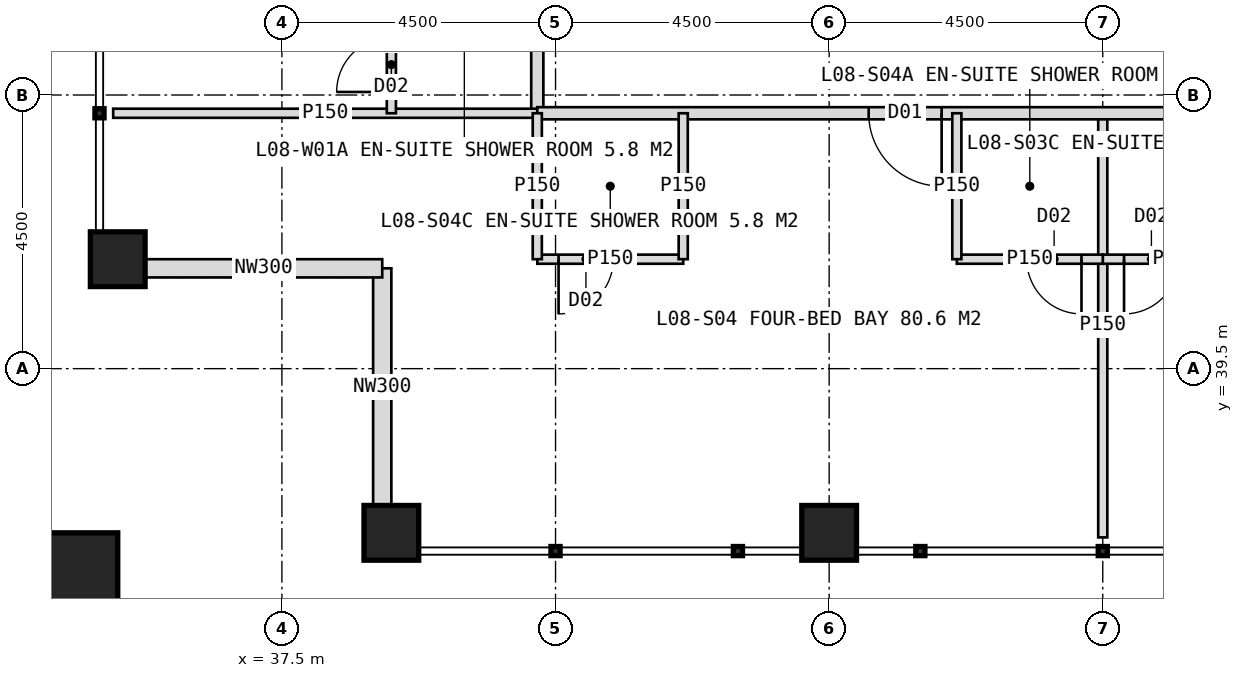
"""IFC4 building model, lengths in metres.
Left out: names, types, materials, properties, quantities, classifications, styles, units other than length and angle.
Written with IfcOpenShell. Run it as: python <this file> out.ifc"""

import sys

from ifc_helpers import new_model, si_unit, direction, frame, frame_2d, origin, origin_2d, place, context, subcontext, project, spatial, rectangle, hollow_rectangle, extrude, element, fill, save


model = new_model("IFC4")
c1 = context("Model", 3, precision=1e-05, world=origin(), true_north=direction((0.0, 1.0)))
c2 = subcontext(c1, "Body", "Model", "MODEL_VIEW")
j1 = project(units=[si_unit("LENGTHUNIT", "METRE"), si_unit("PLANEANGLEUNIT", "RADIAN")], contexts=[c1])
p1 = place(None, origin())
s1 = spatial("IfcSite", under=j1, at=p1, CompositionType="ELEMENT")
p2 = place(p1, origin())
s2 = spatial("IfcBuilding", under=s1, at=p2, CompositionType="ELEMENT")
p3 = place(p2, frame((0.0, 0.0, 39.0)))
s3 = spatial("IfcBuildingStorey", under=s2, at=p3, CompositionType="ELEMENT", Elevation=39.0)
for number, where, z_axis, x_axis in (
    (1, (39.3, 36.8, 0.0), (0.0, 0.0, 1.0), (1.0, 0.0, 0.0)),
    (2, (34.8, 41.3, 0.0), (0.0, 0.0, 1.0), (1.0, 0.0, 0.0)),
    (3, (46.5, 36.8, 0.0), (0.0, 0.0, 1.0), (1.0, 0.0, 0.0)),
):
    element("IfcColumn", number, at=place(p3, frame(where, z_axis=z_axis, x_axis=x_axis)), inside=s3, PredefinedType="COLUMN", context=c2, shape_type="SweptSolid", body=[
        extrude(hollow_rectangle(XDim=0.9, YDim=0.9, WallThickness=0.08, at=origin_2d()), origin(), (0.0, 0.0, 1.0), 4.0),
    ])
p4 = place(p3, frame((33.9, 35.9, 0.0), z_axis=(0.0, 0.0, 1.0), x_axis=(1.0, 0.0, 0.0)))
e4 = element("IfcColumn", 4, at=p4, inside=s3, PredefinedType="COLUMN", context=c2, shape_type="SweptSolid", body=[
    extrude(hollow_rectangle(XDim=1.8, YDim=1.8, WallThickness=0.1, at=origin_2d()), origin(), (0.0, 0.0, 1.0), 4.0),
])
for number, where, z_axis, x_axis in (
    (5, (39.15, 37.25, 0.0), (0.0, 0.0, 1.0), (0.0, 1.0, 0.0)),
    (6, (39.15, 41.15, 0.0), (0.0, 0.0, 1.0), (-1.0, 0.0, 0.0)),
):
    element("IfcWall", number, at=place(p3, frame(where, z_axis=z_axis, x_axis=x_axis)), inside=s3, PredefinedType="ELEMENTEDWALL", context=c2, shape_type="SweptSolid", body=[
        extrude(rectangle(XDim=3.9, YDim=0.3, at=frame_2d((1.95, 0.0))), origin(), (0.0, 0.0, 1.0), 2.95),
    ])
p5 = place(p3, frame((41.7, 43.7, 0.0), z_axis=(0.0, 0.0, 1.0), x_axis=(0.0, 1.0, 0.0)))
e7 = element("IfcWall", 7, at=p5, inside=s3, PredefinedType="PARTITIONING", context=c2, shape_type="SweptSolid", body=[
    extrude(rectangle(XDim=36.6, YDim=0.2, at=frame_2d((18.3, 0.0))), origin(), (0.0, 0.0, 1.0), 3.75),
])
p6 = place(p5, frame((2.65, 0.0, 0.0)))
e8 = element("IfcOpeningElement", 8, at=p6, cuts=e7, PredefinedType="OPENING", context=c2, shape_type="SweptSolid", body=[
    extrude(rectangle(XDim=1.2, YDim=2.2, at=frame_2d((0.6, 1.1))), frame((0.0, 0.11, 0.0), z_axis=(0.0, -1.0, 0.0), x_axis=(1.0, 0.0, 0.0)), (0.0, 0.0, 1.0), 0.22),
])
p7 = place(p5, frame((8.95, 0.0, 0.0)))
e9 = element("IfcOpeningElement", 9, at=p7, cuts=e7, PredefinedType="OPENING", context=c2, shape_type="SweptSolid", body=[
    extrude(rectangle(XDim=1.2, YDim=2.2, at=frame_2d((0.6, 1.1))), frame((0.0, 0.11, 0.0), z_axis=(0.0, -1.0, 0.0), x_axis=(1.0, 0.0, 0.0)), (0.0, 0.0, 1.0), 0.22),
])
p8 = place(p5, frame((14.95, 0.0, 0.0)))
e10 = element("IfcOpeningElement", 10, at=p8, cuts=e7, PredefinedType="OPENING", context=c2, shape_type="SweptSolid", body=[
    extrude(rectangle(XDim=1.2, YDim=2.2, at=frame_2d((0.6, 1.1))), frame((0.0, 0.11, 0.0), z_axis=(0.0, -1.0, 0.0), x_axis=(1.0, 0.0, 0.0)), (0.0, 0.0, 1.0), 0.22),
])
p9 = place(p5, frame((20.95, 0.0, 0.0)))
e11 = element("IfcOpeningElement", 11, at=p9, cuts=e7, PredefinedType="OPENING", context=c2, shape_type="SweptSolid", body=[
    extrude(rectangle(XDim=1.2, YDim=2.2, at=frame_2d((0.6, 1.1))), frame((0.0, 0.11, 0.0), z_axis=(0.0, -1.0, 0.0), x_axis=(1.0, 0.0, 0.0)), (0.0, 0.0, 1.0), 0.22),
])
p10 = place(p5, frame((29.95, 0.0, 0.0)))
e12 = element("IfcOpeningElement", 12, at=p10, cuts=e7, PredefinedType="OPENING", context=c2, shape_type="SweptSolid", body=[
    extrude(rectangle(XDim=1.2, YDim=2.2, at=frame_2d((0.6, 1.1))), frame((0.0, 0.11, 0.0), z_axis=(0.0, -1.0, 0.0), x_axis=(1.0, 0.0, 0.0)), (0.0, 0.0, 1.0), 0.22),
])
p11 = place(p3, frame((41.7, 43.7, 0.0), z_axis=(0.0, 0.0, 1.0), x_axis=(-1.0, 0.0, 0.0)))
e13 = element("IfcWall", 13, at=p11, inside=s3, PredefinedType="PARTITIONING", context=c2, shape_type="SweptSolid", body=[
    extrude(rectangle(XDim=6.975, YDim=0.15, at=frame_2d((3.487, 0.0))), origin(), (0.0, 0.0, 1.0), 3.75),
])
p12 = place(p3, frame((39.3, 43.7, 0.0), z_axis=(0.0, 0.0, 1.0), x_axis=(0.0, 1.0, 0.0)))
e14 = element("IfcWall", 14, at=p12, inside=s3, PredefinedType="PARTITIONING", context=c2, shape_type="SweptSolid", body=[
    extrude(rectangle(XDim=2.4, YDim=0.15, at=frame_2d((1.2, 0.0))), origin(), (0.0, 0.0, 1.0), 2.95),
])
p13 = place(p12, frame((0.35, 0.0, 0.0)))
e15 = element("IfcOpeningElement", 15, at=p13, cuts=e14, PredefinedType="OPENING", context=c2, shape_type="SweptSolid", body=[
    extrude(rectangle(XDim=0.9, YDim=2.1, at=frame_2d((0.45, 1.05))), frame((0.0, 0.085, 0.0), z_axis=(0.0, -1.0, 0.0), x_axis=(1.0, 0.0, 0.0)), (0.0, 0.0, 1.0), 0.17),
])
p14 = place(p3, frame((51.0, 43.7, 0.0), z_axis=(0.0, 0.0, 1.0), x_axis=(0.0, -1.0, 0.0)))
e16 = element("IfcWall", 16, at=p14, inside=s3, PredefinedType="PARTITIONING", context=c2, shape_type="SweptSolid", body=[
    extrude(rectangle(XDim=6.975, YDim=0.15, at=frame_2d((3.487, 0.0))), origin(), (0.0, 0.0, 1.0), 3.75),
])
p15 = place(p3, frame((78.3, 43.7, 0.0), z_axis=(0.0, 0.0, 1.0), x_axis=(-1.0, 0.0, 0.0)))
e17 = element("IfcWall", 17, at=p15, inside=s3, PredefinedType="PARTITIONING", context=c2, shape_type="SweptSolid", body=[
    extrude(rectangle(XDim=36.6, YDim=0.2, at=frame_2d((18.3, 0.0))), origin(), (0.0, 0.0, 1.0), 3.75),
])
p16 = place(p15, frame((2.65, 0.0, 0.0)))
e18 = element("IfcOpeningElement", 18, at=p16, cuts=e17, PredefinedType="OPENING", context=c2, shape_type="SweptSolid", body=[
    extrude(rectangle(XDim=1.2, YDim=2.2, at=frame_2d((0.6, 1.1))), frame((0.0, 0.11, 0.0), z_axis=(0.0, -1.0, 0.0), x_axis=(1.0, 0.0, 0.0)), (0.0, 0.0, 1.0), 0.22),
])
p17 = place(p15, frame((11.95, 0.0, 0.0)))
e19 = element("IfcOpeningElement", 19, at=p17, cuts=e17, PredefinedType="OPENING", context=c2, shape_type="SweptSolid", body=[
    extrude(rectangle(XDim=1.2, YDim=2.2, at=frame_2d((0.6, 1.1))), frame((0.0, 0.11, 0.0), z_axis=(0.0, -1.0, 0.0), x_axis=(1.0, 0.0, 0.0)), (0.0, 0.0, 1.0), 0.22),
])
p18 = place(p15, frame((20.95, 0.0, 0.0)))
e20 = element("IfcOpeningElement", 20, at=p18, cuts=e17, PredefinedType="OPENING", context=c2, shape_type="SweptSolid", body=[
    extrude(rectangle(XDim=1.2, YDim=2.2, at=frame_2d((0.6, 1.1))), frame((0.0, 0.11, 0.0), z_axis=(0.0, -1.0, 0.0), x_axis=(1.0, 0.0, 0.0)), (0.0, 0.0, 1.0), 0.22),
])
p19 = place(p15, frame((29.95, 0.0, 0.0)))
e21 = element("IfcOpeningElement", 21, at=p19, cuts=e17, PredefinedType="OPENING", context=c2, shape_type="SweptSolid", body=[
    extrude(rectangle(XDim=1.2, YDim=2.2, at=frame_2d((0.6, 1.1))), frame((0.0, 0.11, 0.0), z_axis=(0.0, -1.0, 0.0), x_axis=(1.0, 0.0, 0.0)), (0.0, 0.0, 1.0), 0.22),
])
p20 = place(p3, frame((53.4, 41.3, 0.0), z_axis=(0.0, 0.0, 1.0), x_axis=(-1.0, 0.0, 0.0)))
e22 = element("IfcWall", 22, at=p20, inside=s3, PredefinedType="PARTITIONING", context=c2, shape_type="SweptSolid", body=[
    extrude(rectangle(XDim=2.4, YDim=0.15, at=frame_2d((1.2, 0.0))), origin(), (0.0, 0.0, 1.0), 3.75),
])
p21 = place(p20, frame((1.15, 0.0, 0.0)))
e23 = element("IfcOpeningElement", 23, at=p21, cuts=e22, PredefinedType="OPENING", context=c2, shape_type="SweptSolid", body=[
    extrude(rectangle(XDim=0.9, YDim=2.1, at=frame_2d((0.45, 1.05))), frame((0.0, 0.085, 0.0), z_axis=(0.0, -1.0, 0.0), x_axis=(1.0, 0.0, 0.0)), (0.0, 0.0, 1.0), 0.17),
])
p22 = place(p3, frame((51.0, 41.3, 0.0), z_axis=(0.0, 0.0, 1.0), x_axis=(-1.0, 0.0, 0.0)))
e24 = element("IfcWall", 24, at=p22, inside=s3, PredefinedType="PARTITIONING", context=c2, shape_type="SweptSolid", body=[
    extrude(rectangle(XDim=2.4, YDim=0.15, at=frame_2d((1.2, 0.0))), origin(), (0.0, 0.0, 1.0), 3.75),
])
p23 = place(p22, frame((0.35, 0.0, 0.0)))
e25 = element("IfcOpeningElement", 25, at=p23, cuts=e24, PredefinedType="OPENING", context=c2, shape_type="SweptSolid", body=[
    extrude(rectangle(XDim=0.9, YDim=2.1, at=frame_2d((0.45, 1.05))), frame((0.0, 0.085, 0.0), z_axis=(0.0, -1.0, 0.0), x_axis=(1.0, 0.0, 0.0)), (0.0, 0.0, 1.0), 0.17),
])
p24 = place(p3, frame((48.6, 43.7, 0.0), z_axis=(0.0, 0.0, 1.0), x_axis=(0.0, -1.0, 0.0)))
e26 = element("IfcWall", 26, at=p24, inside=s3, PredefinedType="PARTITIONING", context=c2, shape_type="SweptSolid", body=[
    extrude(rectangle(XDim=2.4, YDim=0.15, at=frame_2d((1.2, 0.0))), origin(), (0.0, 0.0, 1.0), 3.75),
])
p25 = place(p3, frame((44.1, 41.3, 0.0), z_axis=(0.0, 0.0, 1.0), x_axis=(-1.0, 0.0, 0.0)))
e27 = element("IfcWall", 27, at=p25, inside=s3, PredefinedType="PARTITIONING", context=c2, shape_type="SweptSolid", body=[
    extrude(rectangle(XDim=2.4, YDim=0.15, at=frame_2d((1.2, 0.0))), origin(), (0.0, 0.0, 1.0), 2.95),
])
p26 = place(p25, frame((1.15, 0.0, 0.0)))
e28 = element("IfcOpeningElement", 28, at=p26, cuts=e27, PredefinedType="OPENING", context=c2, shape_type="SweptSolid", body=[
    extrude(rectangle(XDim=0.9, YDim=2.1, at=frame_2d((0.45, 1.05))), frame((0.0, 0.085, 0.0), z_axis=(0.0, -1.0, 0.0), x_axis=(1.0, 0.0, 0.0)), (0.0, 0.0, 1.0), 0.17),
])
for number, where, z_axis, x_axis in (
    (29, (44.1, 43.7, 0.0), (0.0, 0.0, 1.0), (0.0, -1.0, 0.0)),
    (30, (41.7, 43.7, 0.0), (0.0, 0.0, 1.0), (0.0, -1.0, 0.0)),
):
    element("IfcWall", number, at=place(p3, frame(where, z_axis=z_axis, x_axis=x_axis)), inside=s3, PredefinedType="PARTITIONING", context=c2, shape_type="SweptSolid", body=[
        extrude(rectangle(XDim=2.4, YDim=0.15, at=frame_2d((1.2, 0.0))), origin(), (0.0, 0.0, 1.0), 3.75),
    ])
p27 = place(p13, origin())
e31 = element("IfcDoor", 31, at=p27, inside=s3, OperationType="SINGLE_SWING_LEFT", PredefinedType="DOOR", context=c2, shape_type="SweptSolid", body=[
    extrude(rectangle(XDim=0.9, YDim=2.1, at=frame_2d((0.45, 1.05))), frame((0.0, 0.025, 0.0), z_axis=(0.0, -1.0, 0.0), x_axis=(1.0, 0.0, 0.0)), (0.0, 0.0, 1.0), 0.05),
])
fill(e15, e31)
p28 = place(p21, origin())
e32 = element("IfcDoor", 32, at=p28, inside=s3, OperationType="SINGLE_SWING_RIGHT", PredefinedType="DOOR", context=c2, shape_type="SweptSolid", body=[
    extrude(rectangle(XDim=0.9, YDim=2.1, at=frame_2d((0.45, 1.05))), frame((0.0, 0.025, 0.0), z_axis=(0.0, -1.0, 0.0), x_axis=(1.0, 0.0, 0.0)), (0.0, 0.0, 1.0), 0.05),
])
fill(e23, e32)
p29 = place(p19, origin())
e33 = element("IfcDoor", 33, at=p29, inside=s3, OperationType="SINGLE_SWING_LEFT", PredefinedType="DOOR", context=c2, shape_type="SweptSolid", body=[
    extrude(rectangle(XDim=1.2, YDim=2.2, at=frame_2d((0.6, 1.1))), frame((0.0, 0.025, 0.0), z_axis=(0.0, -1.0, 0.0), x_axis=(1.0, 0.0, 0.0)), (0.0, 0.0, 1.0), 0.05),
])
fill(e21, e33)
p30 = place(p23, origin())
e34 = element("IfcDoor", 34, at=p30, inside=s3, OperationType="SINGLE_SWING_LEFT", PredefinedType="DOOR", context=c2, shape_type="SweptSolid", body=[
    extrude(rectangle(XDim=0.9, YDim=2.1, at=frame_2d((0.45, 1.05))), frame((0.0, 0.025, 0.0), z_axis=(0.0, -1.0, 0.0), x_axis=(1.0, 0.0, 0.0)), (0.0, 0.0, 1.0), 0.05),
])
fill(e25, e34)
p31 = place(p26, origin())
e35 = element("IfcDoor", 35, at=p31, inside=s3, OperationType="SINGLE_SWING_RIGHT", PredefinedType="DOOR", context=c2, shape_type="SweptSolid", body=[
    extrude(rectangle(XDim=0.9, YDim=2.1, at=frame_2d((0.45, 1.05))), frame((0.0, 0.025, 0.0), z_axis=(0.0, -1.0, 0.0), x_axis=(1.0, 0.0, 0.0)), (0.0, 0.0, 1.0), 0.05),
])
fill(e28, e35)
save(model, sys.argv[1])
